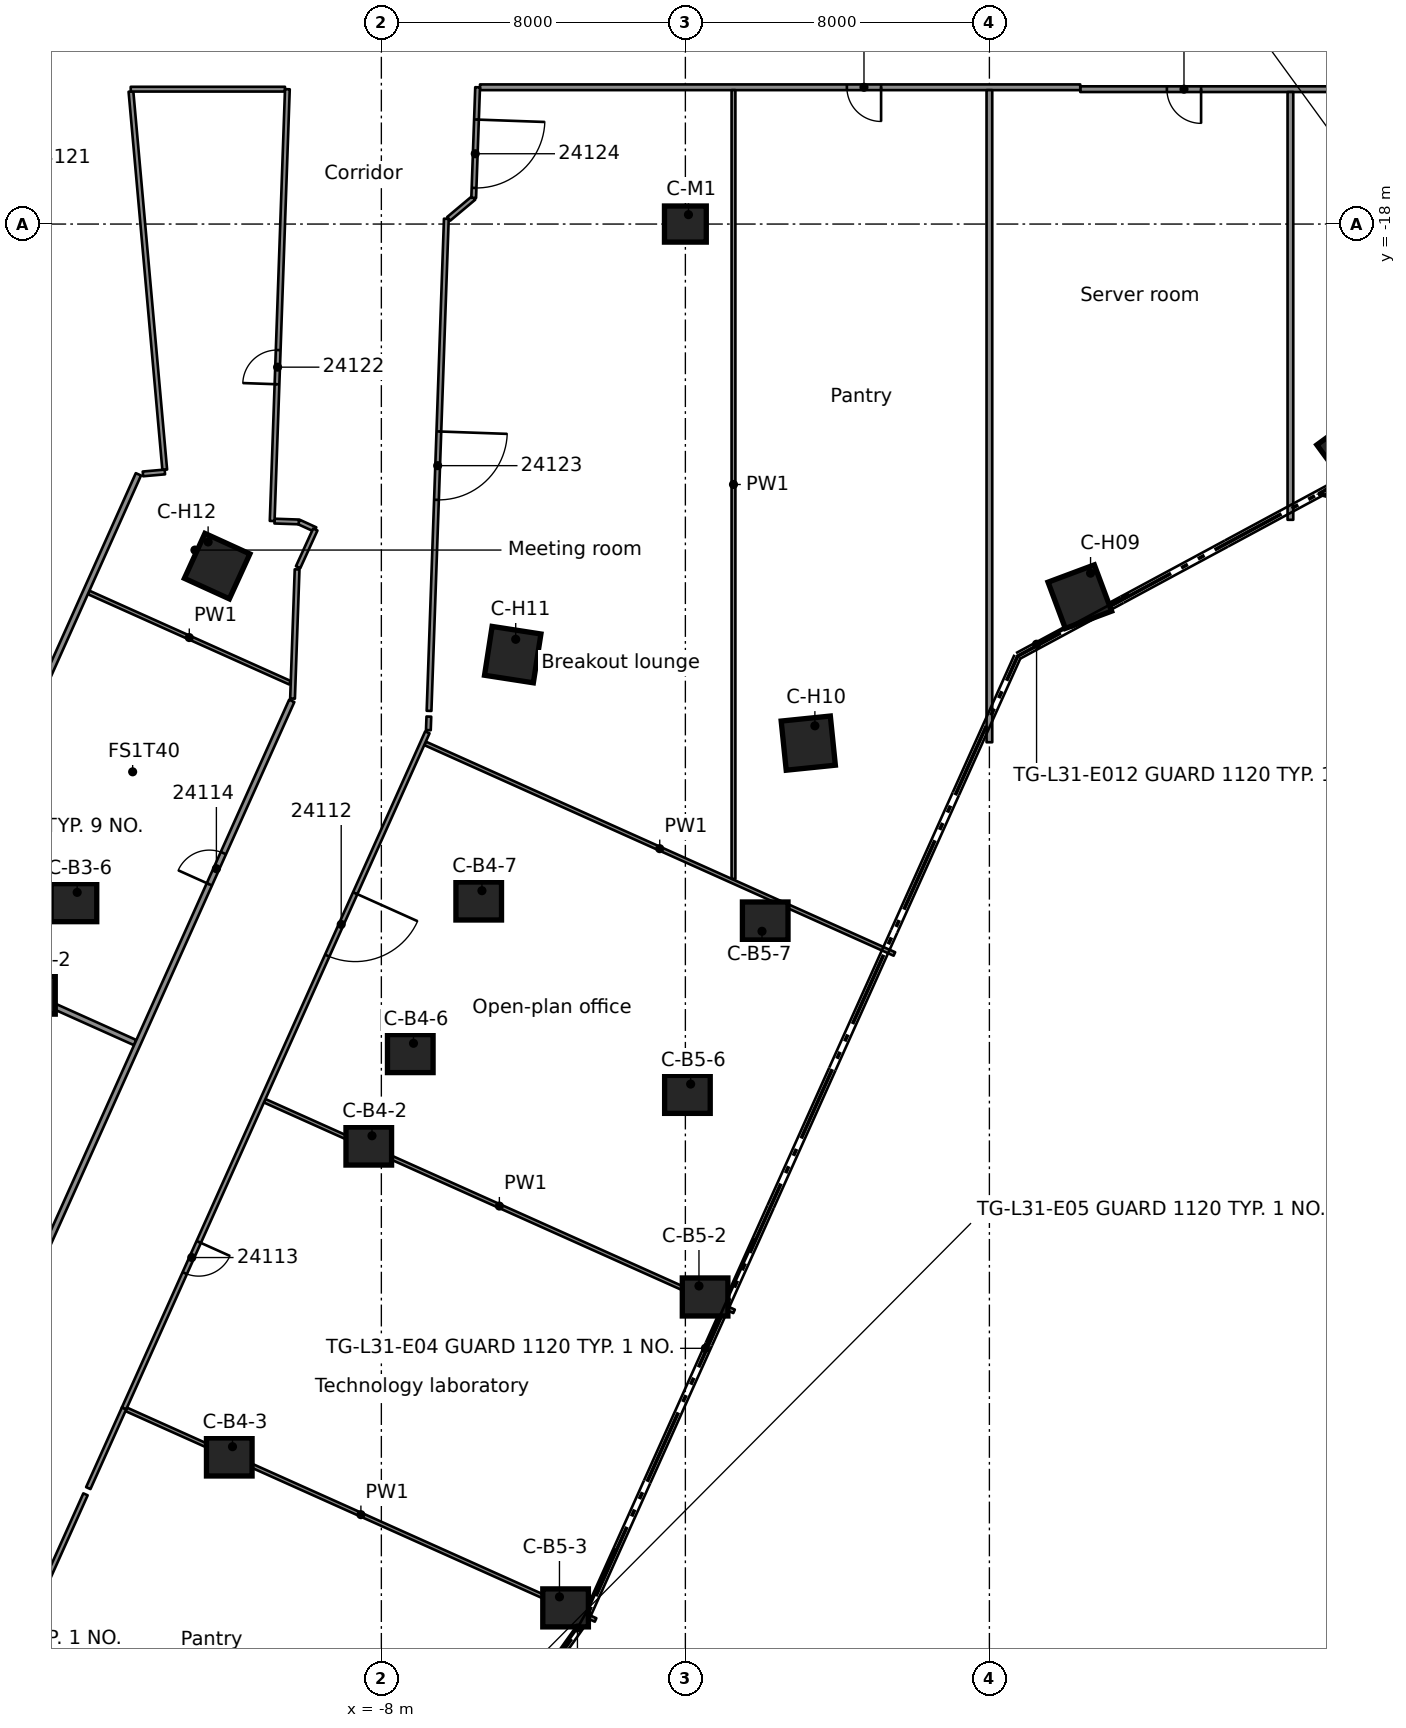
"""IFC4 building model, lengths in metres.
Left out: names, types, materials, properties, quantities, classifications, styles, units other than length and angle.
Written with IfcOpenShell. Run it as: python <this file> out.ifc"""

import sys

from ifc_helpers import new_model, si_unit, direction, frame, frame_2d, origin, origin_2d, place, context, subcontext, project, spatial, rectangle, extrude, element, fill, save


model = new_model("IFC4")
c1 = context("Model", 3, precision=1e-05, world=origin(), true_north=direction((0.0, 1.0)))
c2 = subcontext(c1, "Body", "Model", "MODEL_VIEW")
j1 = project(units=[si_unit("LENGTHUNIT", "METRE"), si_unit("PLANEANGLEUNIT", "RADIAN")], contexts=[c1])
p1 = place(None, origin())
s1 = spatial("IfcSite", under=j1, at=p1, CompositionType="ELEMENT")
p2 = place(p1, origin())
s2 = spatial("IfcBuilding", under=s1, at=p2, CompositionType="ELEMENT")
p3 = place(p2, frame((0.0, 0.0, 123.7)))
s3 = spatial("IfcBuildingStorey", under=s2, at=p3, CompositionType="ELEMENT", Elevation=123.7)
for number, where, z_axis, x_axis in (
    (1, (-17.181, -38.289, 0.0), (0.0, 0.0, 1.0), (1.0, 0.0, 0.0)),
    (2, (-16.089, -35.856, 0.0), (0.0, 0.0, 1.0), (1.0, 0.0, 0.0)),
    (3, (-8.331, -42.26, 0.0), (0.0, 0.0, 1.0), (1.0, 0.0, 0.0)),
    (4, (-12.002, -50.441, 0.0), (0.0, 0.0, 1.0), (1.0, 0.0, 0.0)),
    (5, (-7.239, -39.827, 0.0), (0.0, 0.0, 1.0), (1.0, 0.0, 0.0)),
    (6, (-5.438, -35.812, 0.0), (0.0, 0.0, 1.0), (1.0, 0.0, 0.0)),
    (7, (0.519, -46.231, 0.0), (0.0, 0.0, 1.0), (1.0, 0.0, 0.0)),
    (8, (-3.152, -54.412, 0.0), (0.0, 0.0, 1.0), (1.0, 0.0, 0.0)),
    (9, (0.054, -40.9, 0.0), (0.0, 0.0, 1.0), (1.0, 0.0, 0.0)),
    (10, (2.101, -36.338, 0.0), (0.0, 0.0, 1.0), (1.0, 0.0, 0.0)),
):
    element("IfcColumn", number, at=place(p3, frame(where, z_axis=z_axis, x_axis=x_axis)), inside=s3, PredefinedType="COLUMN", context=c2, shape_type="SweptSolid", body=[
        extrude(rectangle(XDim=1.2, YDim=1.0, at=origin_2d()), origin(), (0.0, 0.0, 1.0), 3.5),
    ])
for number, where, z_axis, x_axis in (
    (11, (17.526, -23.951, 0.0), (0.0, 0.0, 1.0), (0.591, -0.807, 0.0)),
    (12, (10.38, -27.804, 0.0), (0.0, 0.0, 1.0), (0.35, -0.937, 0.0)),
    (13, (3.234, -31.658, 0.0), (0.0, 0.0, 1.0), (0.102, -0.995, 0.0)),
    (14, (-4.543, -29.329, 0.0), (0.0, 0.0, 1.0), (-0.153, -0.988, 0.0)),
    (15, (-12.321, -27.001, 0.0), (0.0, 0.0, 1.0), (-0.415, -0.91, 0.0)),
):
    element("IfcColumn", number, at=place(p3, frame(where, z_axis=z_axis, x_axis=x_axis)), inside=s3, PredefinedType="COLUMN", context=c2, shape_type="SweptSolid", body=[
        extrude(rectangle(XDim=1.3, YDim=1.3, at=origin_2d()), origin(), (0.0, 0.0, 1.0), 3.5),
    ])
p4 = place(p3, frame((0.0, -18.0, 0.0), z_axis=(0.0, 0.0, 1.0), x_axis=(1.0, 0.0, 0.0)))
e16 = element("IfcColumn", 16, at=p4, inside=s3, PredefinedType="COLUMN", context=c2, shape_type="SweptSolid", body=[
    extrude(rectangle(XDim=1.1, YDim=0.95, at=origin_2d()), origin(), (0.0, 0.0, 1.0), 3.5),
])
p5 = place(p3, frame((-14.589, -14.513, 0.0), z_axis=(0.0, 0.0, 1.0), x_axis=(0.088989077037, -0.99603260196, 0.0)))
e17 = element("IfcWall", 17, at=p5, inside=s3, PredefinedType="PARTITIONING", context=c2, shape_type="SweptSolid", body=[
    extrude(rectangle(XDim=9.992, YDim=0.125, at=frame_2d((4.996, 0.0))), origin(), (0.0, 0.0, 1.0), 3.08),
])
p6 = place(p3, frame((-10.173, -25.838, 0.0), z_axis=(0.0, 0.0, 1.0), x_axis=(0.909209708064, -0.416338452178, 0.0)))
e18 = element("IfcWall", 18, at=p6, inside=s3, PredefinedType="PARTITIONING", context=c2, shape_type="SweptSolid", body=[
    extrude(rectangle(XDim=0.479, YDim=0.125, at=frame_2d((0.239, 0.0))), origin(), (0.0, 0.0, 1.0), 3.08),
])
p7 = place(p3, frame((-14.713, -49.188, 0.0), z_axis=(0.0, 0.0, 1.0), x_axis=(0.912374858899, -0.409355733865, 0.0)))
e19 = element("IfcWall", 19, at=p7, inside=s3, PredefinedType="PARTITIONING", context=c2, shape_type="SweptSolid", body=[
    extrude(rectangle(XDim=13.536, YDim=0.1, at=frame_2d((6.768, 0.0))), origin(), (0.0, 0.0, 1.0), 3.08),
])
p8 = place(p3, frame((-19.917, -37.098, 0.0), z_axis=(0.0, 0.0, 1.0), x_axis=(0.912388526433, -0.409325270211, 0.0)))
e20 = element("IfcWall", 20, at=p8, inside=s3, PredefinedType="PARTITIONING", context=c2, shape_type="SweptSolid", body=[
    extrude(rectangle(XDim=5.959, YDim=0.15, at=frame_2d((2.979, 0.0))), origin(), (0.0, 0.0, 1.0), 3.08),
])
p9 = place(p3, frame((-11.07, -41.068, 0.0), z_axis=(0.0, 0.0, 1.0), x_axis=(0.912396704378, -0.409307041033, 0.0)))
e21 = element("IfcWall", 21, at=p9, inside=s3, PredefinedType="PARTITIONING", context=c2, shape_type="SweptSolid", body=[
    extrude(rectangle(XDim=13.537, YDim=0.1, at=frame_2d((6.769, 0.0))), origin(), (0.0, 0.0, 1.0), 3.08),
])
p10 = place(p3, frame((-15.704, -27.692, 0.0), z_axis=(0.0, 0.0, 1.0), x_axis=(0.912424912587, -0.409244155597, 0.0)))
e22 = element("IfcWall", 22, at=p10, inside=s3, PredefinedType="PARTITIONING", context=c2, shape_type="SweptSolid", body=[
    extrude(rectangle(XDim=5.809, YDim=0.1, at=frame_2d((2.904, 0.0))), origin(), (0.0, 0.0, 1.0), 3.08),
])
p11 = place(p3, frame((-6.85, -31.664, 0.0), z_axis=(0.0, 0.0, 1.0), x_axis=(0.912350935383, -0.409409050591, 0.0)))
e23 = element("IfcWall", 23, at=p11, inside=s3, PredefinedType="PARTITIONING", context=c2, shape_type="SweptSolid", body=[
    extrude(rectangle(XDim=13.537, YDim=0.1, at=frame_2d((6.768, 0.0))), origin(), (0.0, 0.0, 1.0), 3.08),
])
p12 = place(p3, frame((-10.811, -25.816, 0.0), z_axis=(0.0, 0.0, 1.0), x_axis=(0.99940736131, -0.034422756417, 0.0)))
e24 = element("IfcWall", 24, at=p12, inside=s3, PredefinedType="PARTITIONING", context=c2, shape_type="SweptSolid", body=[
    extrude(rectangle(XDim=0.638, YDim=0.125, at=frame_2d((0.319, 0.0))), origin(), (0.0, 0.0, 1.0), 3.08),
])
p13 = place(p3, frame((-6.228, -17.863, 0.0), z_axis=(0.0, 0.0, 1.0), x_axis=(0.766096721588, 0.642725301488, 0.0)))
e25 = element("IfcWall", 25, at=p13, inside=s3, PredefinedType="PARTITIONING", context=c2, shape_type="SweptSolid", body=[
    extrude(rectangle(XDim=0.859, YDim=0.125, at=frame_2d((0.429, 0.0))), origin(), (0.0, 0.0, 1.0), 3.08),
])
p14 = place(p3, frame((-14.595, -14.451, 0.0), z_axis=(0.0, 0.0, 1.0), x_axis=(1.0, 0.0, 0.0)))
e26 = element("IfcWall", 26, at=p14, inside=s3, PredefinedType="PARTITIONING", context=c2, shape_type="SweptSolid", body=[
    extrude(rectangle(XDim=4.059, YDim=0.125, at=frame_2d((2.03, 0.0))), origin(), (0.0, 0.0, 1.0), 3.08),
])
p15 = place(p3, frame((21.387, -14.451, 0.0), z_axis=(0.0, 0.0, 1.0), x_axis=(-1.0, 0.0, 0.0)))
e27 = element("IfcWall", 27, at=p15, inside=s3, PredefinedType="PARTITIONING", context=c2, shape_type="SweptSolid", body=[
    extrude(rectangle(XDim=10.996, YDim=0.15, at=frame_2d((5.498, 0.0))), origin(), (0.0, 0.0, 1.0), 3.08),
])
p16 = place(p15, frame((7.816, 0.0, 0.0)))
e28 = element("IfcOpeningElement", 28, at=p16, cuts=e27, PredefinedType="OPENING", context=c2, shape_type="SweptSolid", body=[
    extrude(rectangle(XDim=0.9, YDim=2.1, at=frame_2d((0.45, 1.05))), frame((0.0, 0.085, 0.0), z_axis=(0.0, -1.0, 0.0), x_axis=(1.0, 0.0, 0.0)), (0.0, 0.0, 1.0), 0.17),
])
p17 = place(p15, frame((2.288, 0.0, 0.0)))
e29 = element("IfcOpeningElement", 29, at=p17, cuts=e27, PredefinedType="OPENING", context=c2, shape_type="SweptSolid", body=[
    extrude(rectangle(XDim=0.9, YDim=2.1, at=frame_2d((0.45, 1.05))), frame((0.0, 0.085, 0.0), z_axis=(0.0, -1.0, 0.0), x_axis=(1.0, 0.0, 0.0)), (0.0, 0.0, 1.0), 0.17),
])
p18 = place(p3, frame((10.391, -14.401, 0.0), z_axis=(0.0, 0.0, 1.0), x_axis=(-1.0, 0.0, 0.0)))
e30 = element("IfcWall", 30, at=p18, inside=s3, PredefinedType="PARTITIONING", context=c2, shape_type="SweptSolid", body=[
    extrude(rectangle(XDim=15.795, YDim=0.15, at=frame_2d((7.897, 0.0))), origin(), (0.0, 0.0, 1.0), 3.08),
])
p19 = place(p18, frame((5.241, 0.0, 0.0)))
e31 = element("IfcOpeningElement", 31, at=p19, cuts=e30, PredefinedType="OPENING", context=c2, shape_type="SweptSolid", body=[
    extrude(rectangle(XDim=0.9, YDim=2.1, at=frame_2d((0.45, 1.05))), frame((0.0, 0.085, 0.0), z_axis=(0.0, -1.0, 0.0), x_axis=(1.0, 0.0, 0.0)), (0.0, 0.0, 1.0), 0.17),
])
p20 = place(p3, frame((-14.274, -24.574, 0.0), z_axis=(0.0, 0.0, 1.0), x_axis=(0.996111374158, 0.088102952687, 0.0)))
e32 = element("IfcWall", 32, at=p20, inside=s3, PredefinedType="PARTITIONING", context=c2, shape_type="SweptSolid", body=[
    extrude(rectangle(XDim=0.579, YDim=0.125, at=frame_2d((0.29, 0.0))), origin(), (0.0, 0.0, 1.0), 3.08),
])
p21 = place(p3, frame((-10.191, -27.03, 0.0), z_axis=(0.0, 0.0, 1.0), x_axis=(0.414982438297, 0.909829421323, 0.0)))
e33 = element("IfcWall", 33, at=p21, inside=s3, PredefinedType="PARTITIONING", context=c2, shape_type="SweptSolid", body=[
    extrude(rectangle(XDim=1.091, YDim=0.125, at=frame_2d((0.546, 0.0))), origin(), (0.0, 0.0, 1.0), 3.08),
])
p22 = place(p3, frame((-15.712, -51.26, 0.0), z_axis=(0.0, 0.0, 1.0), x_axis=(0.409583190249, 0.912272771854, 0.0)))
e34 = element("IfcWall", 34, at=p22, inside=s3, PredefinedType="PARTITIONING", context=c2, shape_type="SweptSolid", body=[
    extrude(rectangle(XDim=2.3, YDim=0.125, at=frame_2d((1.15, 0.0))), origin(), (0.0, 0.0, 1.0), 3.08),
])
p23 = place(p3, frame((-17.186, -54.545, 0.0), z_axis=(0.0, 0.0, 1.0), x_axis=(0.409572220998, 0.91227769664, 0.0)))
e35 = element("IfcWall", 35, at=p23, inside=s3, PredefinedType="PARTITIONING", context=c2, shape_type="SweptSolid", body=[
    extrude(rectangle(XDim=3.421, YDim=0.125, at=frame_2d((1.71, 0.0))), origin(), (0.0, 0.0, 1.0), 3.08),
])
p24 = place(p3, frame((-6.789, -31.374, 0.0), z_axis=(0.0, 0.0, 1.0), x_axis=(-0.409354309939, -0.912375497772, 0.0)))
e36 = element("IfcWall", 36, at=p24, inside=s3, PredefinedType="PARTITIONING", context=c2, shape_type="SweptSolid", body=[
    extrude(rectangle(XDim=19.496, YDim=0.125, at=frame_2d((9.748, 0.0))), origin(), (0.0, 0.0, 1.0), 3.08),
])
p25 = place(p24, frame((4.639, 0.0, 0.0)))
e37 = element("IfcOpeningElement", 37, at=p25, cuts=e36, PredefinedType="OPENING", context=c2, shape_type="SweptSolid", body=[
    extrude(rectangle(XDim=1.8, YDim=2.1, at=frame_2d((0.9, 1.05))), frame((0.0, 0.073, 0.0), z_axis=(0.0, -1.0, 0.0), x_axis=(1.0, 0.0, 0.0)), (0.0, 0.0, 1.0), 0.145),
])
p26 = place(p24, frame((14.697, 0.0, 0.0)))
e38 = element("IfcOpeningElement", 38, at=p26, cuts=e36, PredefinedType="OPENING", context=c2, shape_type="SweptSolid", body=[
    extrude(rectangle(XDim=0.9, YDim=2.1, at=frame_2d((0.45, 1.05))), frame((0.0, 0.073, 0.0), z_axis=(0.0, -1.0, 0.0), x_axis=(1.0, 0.0, 0.0)), (0.0, 0.0, 1.0), 0.145),
])
p27 = place(p3, frame((-18.997, -49.786, 0.0), z_axis=(0.0, 0.0, 1.0), x_axis=(0.409621859923, 0.912255409342, 0.0)))
e39 = element("IfcWall", 39, at=p27, inside=s3, PredefinedType="PARTITIONING", context=c2, shape_type="SweptSolid", body=[
    extrude(rectangle(XDim=21.091, YDim=0.15, at=frame_2d((10.545, 0.0))), origin(), (0.0, 0.0, 1.0), 3.08),
])
p28 = place(p27, frame((15.8, 0.0, 0.0)))
e40 = element("IfcOpeningElement", 40, at=p28, cuts=e39, PredefinedType="OPENING", context=c2, shape_type="SweptSolid", body=[
    extrude(rectangle(XDim=0.9, YDim=2.1, at=frame_2d((0.45, 1.05))), frame((0.0, 0.085, 0.0), z_axis=(0.0, -1.0, 0.0), x_axis=(1.0, 0.0, 0.0)), (0.0, 0.0, 1.0), 0.17),
])
p29 = place(p3, frame((-14.393, -24.585, 0.0), z_axis=(0.0, 0.0, 1.0), x_axis=(-0.408859666491, -0.912597267756, 0.0)))
e41 = element("IfcWall", 41, at=p29, inside=s3, PredefinedType="PARTITIONING", context=c2, shape_type="SweptSolid", body=[
    extrude(rectangle(XDim=22.577, YDim=0.15, at=frame_2d((11.289, 0.0))), origin(), (0.0, 0.0, 1.0), 3.08),
])
p30 = place(p29, frame((17.777, 0.0, 0.0)))
e42 = element("IfcOpeningElement", 42, at=p30, cuts=e41, PredefinedType="OPENING", context=c2, shape_type="SweptSolid", body=[
    extrude(rectangle(XDim=0.9, YDim=2.1, at=frame_2d((0.45, 1.05))), frame((0.0, 0.085, 0.0), z_axis=(0.0, -1.0, 0.0), x_axis=(1.0, 0.0, 0.0)), (0.0, 0.0, 1.0), 0.17),
])
p31 = place(p3, frame((-6.763, -31.317, 0.0), z_axis=(0.0, 0.0, 1.0), x_axis=(0.036227912686, 0.99934355371, 0.0)))
e43 = element("IfcWall", 43, at=p31, inside=s3, PredefinedType="PARTITIONING", context=c2, shape_type="SweptSolid", body=[
    extrude(rectangle(XDim=0.357, YDim=0.125, at=frame_2d((0.179, 0.0))), origin(), (0.0, 0.0, 1.0), 3.08),
])
p32 = place(p3, frame((-5.467, -14.401, 0.0), z_axis=(0.0, 0.0, 1.0), x_axis=(-0.035380519418, -0.999373913431, 0.0)))
e44 = element("IfcWall", 44, at=p32, inside=s3, PredefinedType="PARTITIONING", context=c2, shape_type="SweptSolid", body=[
    extrude(rectangle(XDim=2.912, YDim=0.125, at=frame_2d((1.456, 0.0))), origin(), (0.0, 0.0, 1.0), 3.08),
])
p33 = place(p32, frame((0.85, 0.0, 0.0)))
e45 = element("IfcOpeningElement", 45, at=p33, cuts=e44, PredefinedType="OPENING", context=c2, shape_type="SweptSolid", body=[
    extrude(rectangle(XDim=1.8, YDim=2.1, at=frame_2d((0.9, 1.05))), frame((0.0, 0.073, 0.0), z_axis=(0.0, -1.0, 0.0), x_axis=(1.0, 0.0, 0.0)), (0.0, 0.0, 1.0), 0.145),
])
p34 = place(p3, frame((-6.29, -17.861, 0.0), z_axis=(0.0, 0.0, 1.0), x_axis=(-0.035124913382, -0.999382929842, 0.0)))
e46 = element("IfcWall", 46, at=p34, inside=s3, PredefinedType="PARTITIONING", context=c2, shape_type="SweptSolid", body=[
    extrude(rectangle(XDim=12.956, YDim=0.125, at=frame_2d((6.478, 0.0))), origin(), (0.0, 0.0, 1.0), 3.08),
])
p35 = place(p34, frame((5.6, 0.0, 0.0)))
e47 = element("IfcOpeningElement", 47, at=p35, cuts=e46, PredefinedType="OPENING", context=c2, shape_type="SweptSolid", body=[
    extrude(rectangle(XDim=1.8, YDim=2.1, at=frame_2d((0.9, 1.05))), frame((0.0, 0.073, 0.0), z_axis=(0.0, -1.0, 0.0), x_axis=(1.0, 0.0, 0.0)), (0.0, 0.0, 1.0), 0.145),
])
p36 = place(p3, frame((-10.217, -27.087, 0.0), z_axis=(0.0, 0.0, 1.0), x_axis=(-0.035243479781, -0.999378755594, 0.0)))
e48 = element("IfcWall", 48, at=p36, inside=s3, PredefinedType="PARTITIONING", context=c2, shape_type="SweptSolid", body=[
    extrude(rectangle(XDim=3.401, YDim=0.125, at=frame_2d((1.701, 0.0))), origin(), (0.0, 0.0, 1.0), 3.08),
])
p37 = place(p3, frame((-10.873, -25.813, 0.0), z_axis=(0.0, 0.0, 1.0), x_axis=(0.035198976063, 0.999380324043, 0.0)))
e49 = element("IfcWall", 49, at=p37, inside=s3, PredefinedType="PARTITIONING", context=c2, shape_type="SweptSolid", body=[
    extrude(rectangle(XDim=11.368, YDim=0.125, at=frame_2d((5.684, 0.0))), origin(), (0.0, 0.0, 1.0), 3.08),
])
p38 = place(p37, frame((3.6, 0.0, 0.0)))
e50 = element("IfcOpeningElement", 50, at=p38, cuts=e49, PredefinedType="OPENING", context=c2, shape_type="SweptSolid", body=[
    extrude(rectangle(XDim=0.9, YDim=2.1, at=frame_2d((0.45, 1.05))), frame((0.0, 0.073, 0.0), z_axis=(0.0, -1.0, 0.0), x_axis=(1.0, 0.0, 0.0)), (0.0, 0.0, 1.0), 0.145),
])
p39 = place(p3, frame((15.921, -25.782, 0.0), z_axis=(0.0, 0.0, 1.0), x_axis=(0.0, 1.0, 0.0)))
e51 = element("IfcWall", 51, at=p39, inside=s3, PredefinedType="PARTITIONING", context=c2, shape_type="SweptSolid", body=[
    extrude(rectangle(XDim=11.256, YDim=0.15, at=frame_2d((5.628, 0.0))), origin(), (0.0, 0.0, 1.0), 3.08),
])
p40 = place(p3, frame((8.0, -31.635, 0.0), z_axis=(0.0, 0.0, 1.0), x_axis=(0.0, 1.0, 0.0)))
e52 = element("IfcWall", 52, at=p40, inside=s3, PredefinedType="PARTITIONING", context=c2, shape_type="SweptSolid", body=[
    extrude(rectangle(XDim=17.159, YDim=0.15, at=frame_2d((8.58, 0.0))), origin(), (0.0, 0.0, 1.0), 3.08),
])
p41 = place(p3, frame((1.266, -35.229, 0.0), z_axis=(0.0, 0.0, 1.0), x_axis=(0.0, 1.0, 0.0)))
e53 = element("IfcWall", 53, at=p41, inside=s3, PredefinedType="PARTITIONING", context=c2, shape_type="SweptSolid", body=[
    extrude(rectangle(XDim=20.753, YDim=0.1, at=frame_2d((10.376, 0.0))), origin(), (0.0, 0.0, 1.0), 3.08),
])
p42 = place(p25, origin())
e54 = element("IfcDoor", 54, at=p42, inside=s3, OperationType="DOUBLE_DOOR_SINGLE_SWING", PredefinedType="DOOR", context=c2, shape_type="SweptSolid", body=[
    extrude(rectangle(XDim=1.8, YDim=2.1, at=frame_2d((0.9, 1.05))), frame((0.0, 0.025, 0.0), z_axis=(0.0, -1.0, 0.0), x_axis=(1.0, 0.0, 0.0)), (0.0, 0.0, 1.0), 0.05),
])
fill(e37, e54)
p43 = place(p26, origin())
e55 = element("IfcDoor", 55, at=p43, inside=s3, OperationType="SINGLE_SWING_RIGHT", PredefinedType="DOOR", context=c2, shape_type="SweptSolid", body=[
    extrude(rectangle(XDim=0.9, YDim=2.1, at=frame_2d((0.45, 1.05))), frame((0.0, 0.025, 0.0), z_axis=(0.0, -1.0, 0.0), x_axis=(1.0, 0.0, 0.0)), (0.0, 0.0, 1.0), 0.05),
])
fill(e38, e55)
p44 = place(p28, origin())
e56 = element("IfcDoor", 56, at=p44, inside=s3, OperationType="SINGLE_SWING_RIGHT", PredefinedType="DOOR", context=c2, shape_type="SweptSolid", body=[
    extrude(rectangle(XDim=0.9, YDim=2.1, at=frame_2d((0.45, 1.05))), frame((0.0, 0.025, 0.0), z_axis=(0.0, -1.0, 0.0), x_axis=(1.0, 0.0, 0.0)), (0.0, 0.0, 1.0), 0.05),
])
fill(e40, e56)
p45 = place(p38, origin())
e57 = element("IfcDoor", 57, at=p45, inside=s3, OperationType="SINGLE_SWING_LEFT", PredefinedType="DOOR", context=c2, shape_type="SweptSolid", body=[
    extrude(rectangle(XDim=0.9, YDim=2.1, at=frame_2d((0.45, 1.05))), frame((0.0, 0.025, 0.0), z_axis=(0.0, -1.0, 0.0), x_axis=(1.0, 0.0, 0.0)), (0.0, 0.0, 1.0), 0.05),
])
fill(e50, e57)
p46 = place(p35, origin())
e58 = element("IfcDoor", 58, at=p46, inside=s3, OperationType="DOUBLE_DOOR_SINGLE_SWING", PredefinedType="DOOR", context=c2, shape_type="SweptSolid", body=[
    extrude(rectangle(XDim=1.8, YDim=2.1, at=frame_2d((0.9, 1.05))), frame((0.0, 0.025, 0.0), z_axis=(0.0, -1.0, 0.0), x_axis=(1.0, 0.0, 0.0)), (0.0, 0.0, 1.0), 0.05),
])
fill(e47, e58)
p47 = place(p33, origin())
e59 = element("IfcDoor", 59, at=p47, inside=s3, OperationType="DOUBLE_DOOR_SINGLE_SWING", PredefinedType="DOOR", context=c2, shape_type="SweptSolid", body=[
    extrude(rectangle(XDim=1.8, YDim=2.1, at=frame_2d((0.9, 1.05))), frame((0.0, 0.025, 0.0), z_axis=(0.0, -1.0, 0.0), x_axis=(1.0, 0.0, 0.0)), (0.0, 0.0, 1.0), 0.05),
])
fill(e45, e59)
p48 = place(p19, origin())
e60 = element("IfcDoor", 60, at=p48, inside=s3, OperationType="SINGLE_SWING_LEFT", PredefinedType="DOOR", context=c2, shape_type="SweptSolid", body=[
    extrude(rectangle(XDim=0.9, YDim=2.1, at=frame_2d((0.45, 1.05))), frame((0.0, 0.025, 0.0), z_axis=(0.0, -1.0, 0.0), x_axis=(1.0, 0.0, 0.0)), (0.0, 0.0, 1.0), 0.05),
])
fill(e31, e60)
p49 = place(p16, origin())
e61 = element("IfcDoor", 61, at=p49, inside=s3, OperationType="SINGLE_SWING_RIGHT", PredefinedType="DOOR", context=c2, shape_type="SweptSolid", body=[
    extrude(rectangle(XDim=0.9, YDim=2.1, at=frame_2d((0.45, 1.05))), frame((0.0, 0.025, 0.0), z_axis=(0.0, -1.0, 0.0), x_axis=(1.0, 0.0, 0.0)), (0.0, 0.0, 1.0), 0.05),
])
fill(e28, e61)
save(model, sys.argv[1])
